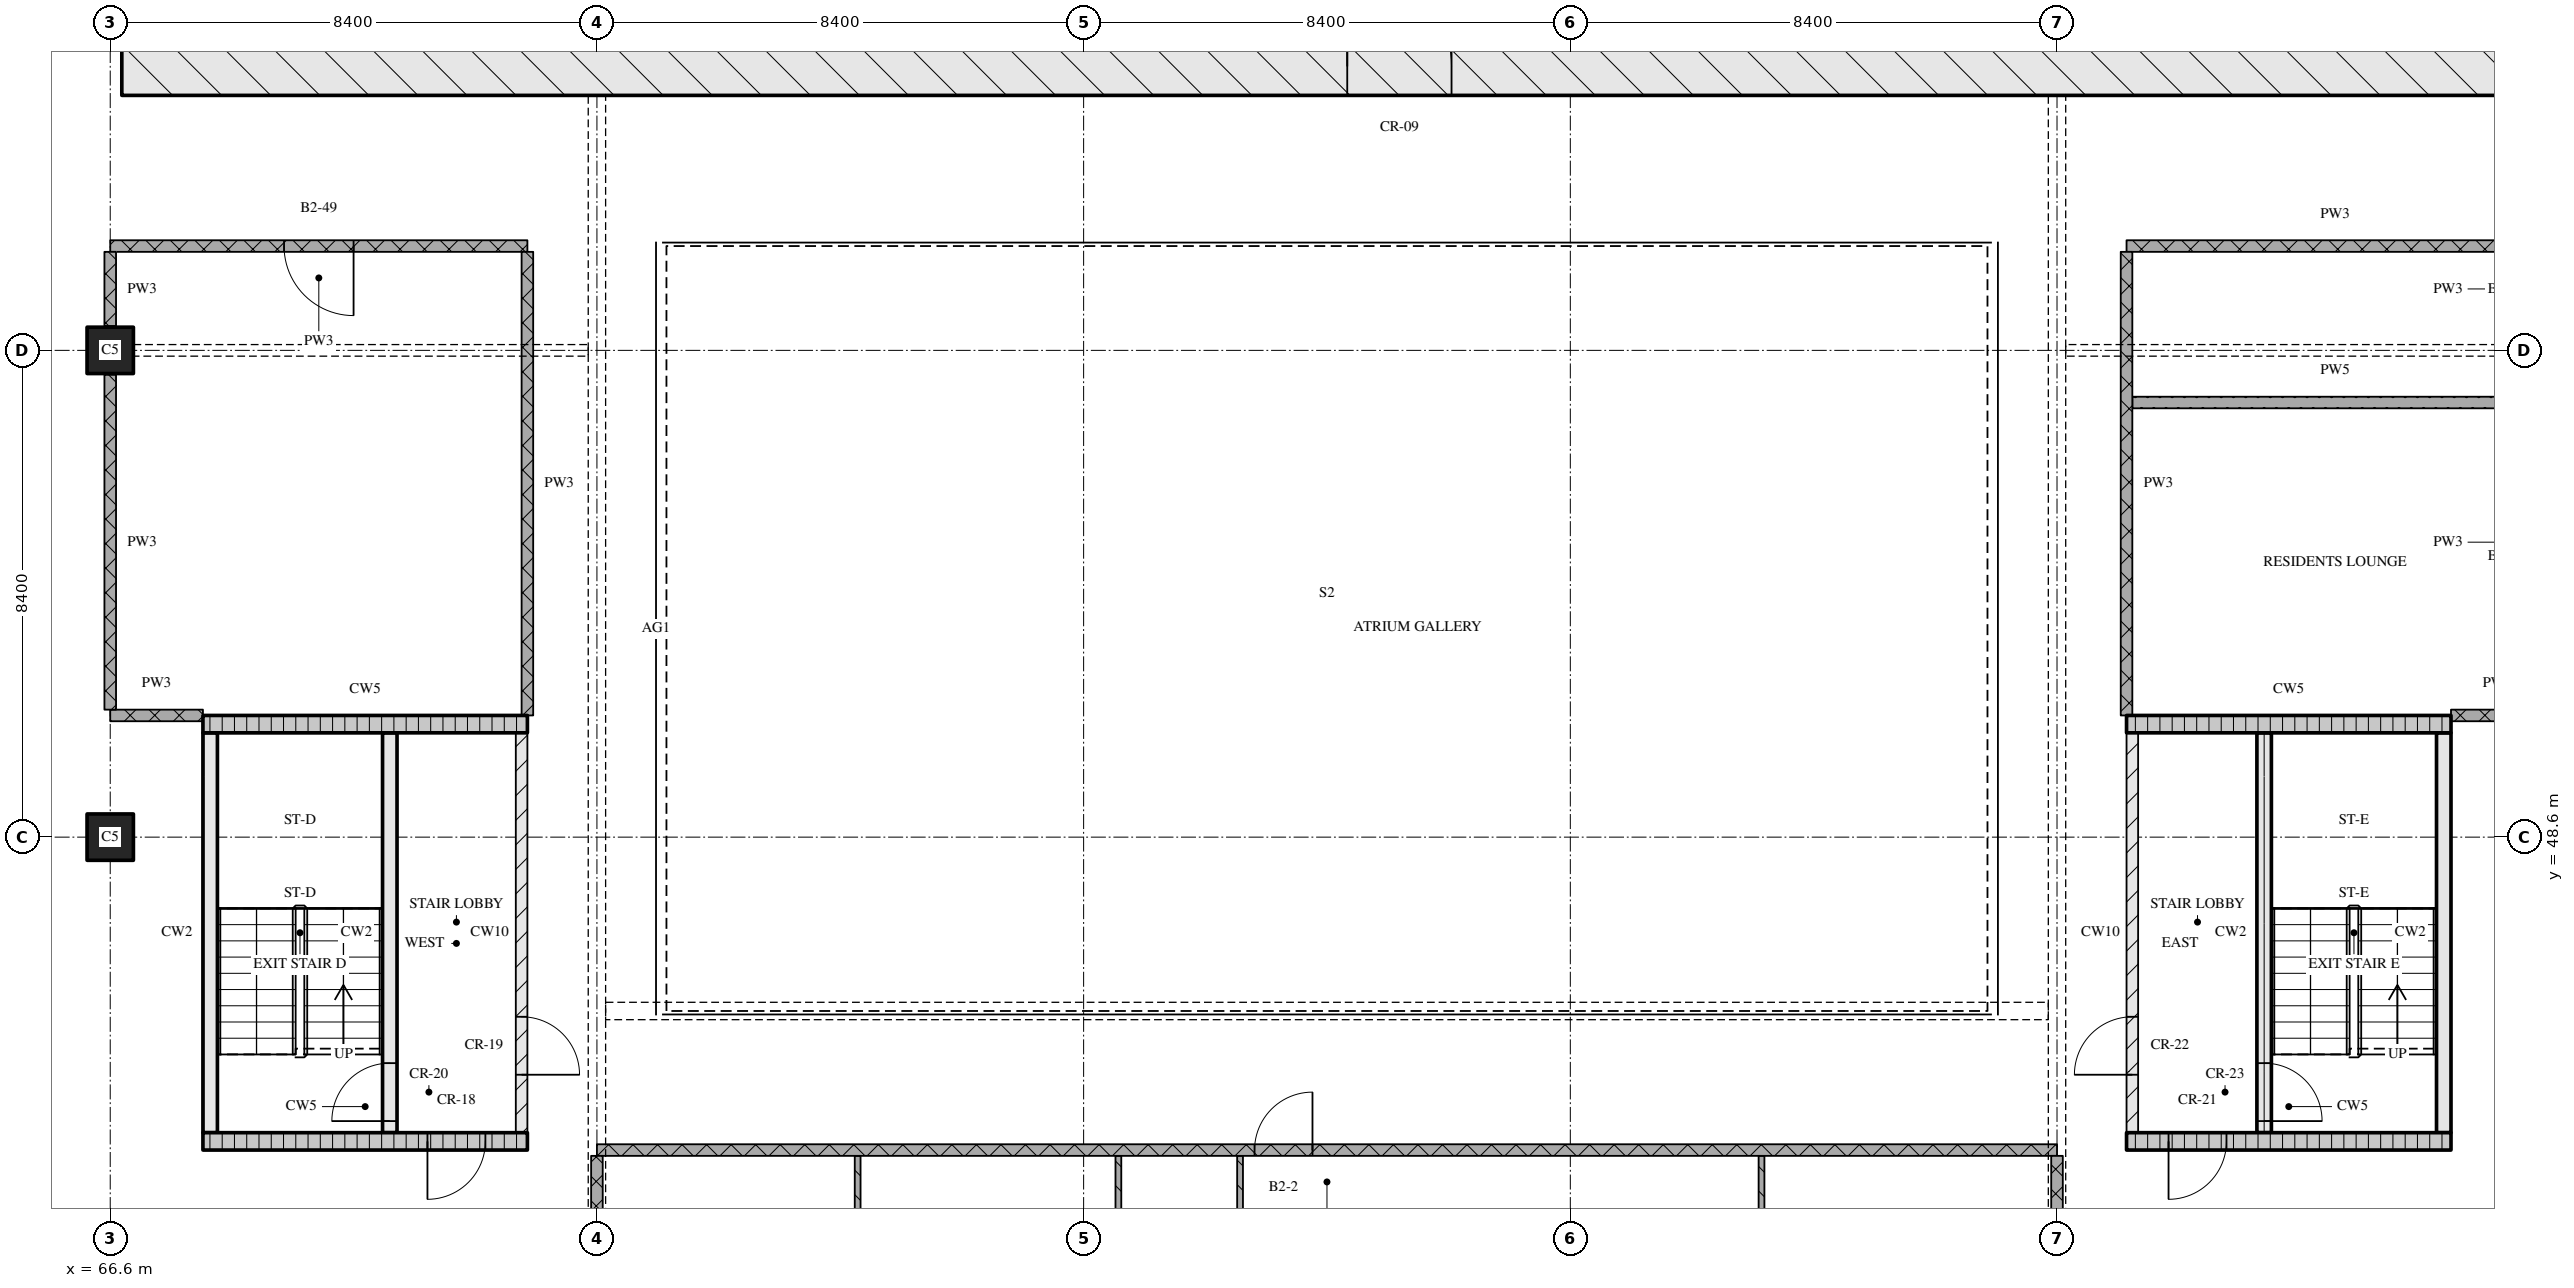
"""IFC4 building model, lengths in metres.
Left out: names, types, materials, properties, quantities, classifications, styles, units other than length and angle.
Written with IfcOpenShell. Run it as: python <this file> out.ifc"""

import sys

from ifc_helpers import new_model, si_unit, direction, frame, frame_2d, origin, origin_2d, place, context, subcontext, project, spatial, rectangle, extrude, element, fill, save


model = new_model("IFC4")
c1 = context("Model", 3, precision=1e-05, world=origin(), true_north=direction((0.0, 1.0)))
c2 = subcontext(c1, "Body", "Model", "MODEL_VIEW")
j1 = project(units=[si_unit("LENGTHUNIT", "METRE"), si_unit("PLANEANGLEUNIT", "RADIAN")], contexts=[c1])
p1 = place(None, origin())
s1 = spatial("IfcSite", under=j1, at=p1, CompositionType="ELEMENT")
p2 = place(p1, origin())
s2 = spatial("IfcBuilding", under=s1, at=p2, CompositionType="ELEMENT")
p3 = place(p2, frame((0.0, 0.0, 113.25)))
s3 = spatial("IfcBuildingStorey", under=s2, at=p3, CompositionType="ELEMENT", Elevation=113.25)
for number, where, z_axis, x_axis in (
    (1, (66.6, 48.6, 0.0), (0.0, 0.0, 1.0), (1.0, 0.0, 0.0)),
    (2, (66.6, 57.0, 0.0), (0.0, 0.0, 1.0), (1.0, 0.0, 0.0)),
):
    element("IfcColumn", number, at=place(p3, frame(where, z_axis=z_axis, x_axis=x_axis)), inside=s3, PredefinedType="COLUMN", context=c2, shape_type="SweptSolid", body=[
        extrude(rectangle(XDim=0.8, YDim=0.8, at=origin_2d()), origin(), (0.0, 0.0, 1.0), 3.6),
    ])
p4 = place(p3, frame((66.8, 61.9, 0.0), z_axis=(0.0, 0.0, 1.0), x_axis=(1.0, 0.0, 0.0)))
e3 = element("IfcWall", 3, at=p4, inside=s3, PredefinedType="SOLIDWALL", context=c2, shape_type="SweptSolid", body=[
    extrude(rectangle(XDim=41.6, YDim=1.0, at=frame_2d((20.8, 0.0))), origin(), (0.0, 0.0, 1.0), 3.32),
])
p5 = place(p4, frame((21.15, 0.0, 0.0)))
e4 = element("IfcOpeningElement", 4, at=p5, cuts=e3, PredefinedType="OPENING", context=c2, shape_type="SweptSolid", body=[
    extrude(rectangle(XDim=1.8, YDim=2.1, at=frame_2d((0.9, 1.05))), frame((0.0, 0.51, 0.0), z_axis=(0.0, -1.0, 0.0), x_axis=(1.0, 0.0, 0.0)), (0.0, 0.0, 1.0), 1.02),
])
p6 = place(p3, frame((68.2, 43.35, 0.0), z_axis=(0.0, 0.0, 1.0), x_axis=(1.0, 0.0, 0.0)))
e5 = element("IfcWall", 5, at=p6, inside=s3, PredefinedType="SOLIDWALL", context=c2, shape_type="SweptSolid", body=[
    extrude(rectangle(XDim=5.6, YDim=0.3, at=frame_2d((2.8, 0.0))), origin(), (0.0, 0.0, 1.0), 3.32),
])
p7 = place(p6, frame((3.875, 0.0, 0.0)))
e6 = element("IfcOpeningElement", 6, at=p7, cuts=e5, PredefinedType="OPENING", context=c2, shape_type="SweptSolid", body=[
    extrude(rectangle(XDim=1.0, YDim=2.1, at=frame_2d((0.5, 1.05))), frame((0.0, 0.16, 0.0), z_axis=(0.0, -1.0, 0.0), x_axis=(1.0, 0.0, 0.0)), (0.0, 0.0, 1.0), 0.32),
])
p8 = place(p3, frame((68.325, 43.5, 0.0), z_axis=(0.0, 0.0, 1.0), x_axis=(0.0, 1.0, 0.0)))
e7 = element("IfcWall", 7, at=p8, inside=s3, PredefinedType="SOLIDWALL", context=c2, shape_type="SweptSolid", body=[
    extrude(rectangle(XDim=6.9, YDim=0.25, at=frame_2d((3.45, 0.0))), origin(), (0.0, 0.0, 1.0), 3.32),
])
p9 = place(p3, frame((71.425, 43.5, 0.0), z_axis=(0.0, 0.0, 1.0), x_axis=(0.0, 1.0, 0.0)))
e8 = element("IfcWall", 8, at=p9, inside=s3, PredefinedType="SOLIDWALL", context=c2, shape_type="SweptSolid", body=[
    extrude(rectangle(XDim=6.9, YDim=0.25, at=frame_2d((3.45, 0.0))), origin(), (0.0, 0.0, 1.0), 3.32),
])
p10 = place(p9, frame((0.2, 0.0, 0.0)))
e9 = element("IfcOpeningElement", 9, at=p10, cuts=e8, PredefinedType="OPENING", context=c2, shape_type="SweptSolid", body=[
    extrude(rectangle(XDim=1.0, YDim=2.1, at=frame_2d((0.5, 1.05))), frame((0.0, 0.135, 0.0), z_axis=(0.0, -1.0, 0.0), x_axis=(1.0, 0.0, 0.0)), (0.0, 0.0, 1.0), 0.27),
])
p11 = place(p3, frame((73.7, 43.5, 0.0), z_axis=(0.0, 0.0, 1.0), x_axis=(0.0, 1.0, 0.0)))
e10 = element("IfcWall", 10, at=p11, inside=s3, PredefinedType="PARTITIONING", context=c2, shape_type="SweptSolid", body=[
    extrude(rectangle(XDim=6.9, YDim=0.2, at=frame_2d((3.45, 0.0))), origin(), (0.0, 0.0, 1.0), 3.32),
])
p12 = place(p11, frame((1.0, 0.0, 0.0)))
e11 = element("IfcOpeningElement", 11, at=p12, cuts=e10, PredefinedType="OPENING", context=c2, shape_type="SweptSolid", body=[
    extrude(rectangle(XDim=1.0, YDim=2.1, at=frame_2d((0.5, 1.05))), frame((0.0, 0.11, 0.0), z_axis=(0.0, -1.0, 0.0), x_axis=(1.0, 0.0, 0.0)), (0.0, 0.0, 1.0), 0.22),
])
p13 = place(p3, frame((68.2, 50.55, 0.0), z_axis=(0.0, 0.0, 1.0), x_axis=(1.0, 0.0, 0.0)))
e12 = element("IfcWall", 12, at=p13, inside=s3, PredefinedType="SOLIDWALL", context=c2, shape_type="SweptSolid", body=[
    extrude(rectangle(XDim=5.6, YDim=0.3, at=frame_2d((2.8, 0.0))), origin(), (0.0, 0.0, 1.0), 3.32),
])
p14 = place(p3, frame((101.4, 43.35, 0.0), z_axis=(0.0, 0.0, 1.0), x_axis=(1.0, 0.0, 0.0)))
e13 = element("IfcWall", 13, at=p14, inside=s3, PredefinedType="SOLIDWALL", context=c2, shape_type="SweptSolid", body=[
    extrude(rectangle(XDim=5.6, YDim=0.3, at=frame_2d((2.8, 0.0))), origin(), (0.0, 0.0, 1.0), 3.32),
])
p15 = place(p14, frame((0.725, 0.0, 0.0)))
e14 = element("IfcOpeningElement", 14, at=p15, cuts=e13, PredefinedType="OPENING", context=c2, shape_type="SweptSolid", body=[
    extrude(rectangle(XDim=1.0, YDim=2.1, at=frame_2d((0.5, 1.05))), frame((0.0, 0.16, 0.0), z_axis=(0.0, -1.0, 0.0), x_axis=(1.0, 0.0, 0.0)), (0.0, 0.0, 1.0), 0.32),
])
p16 = place(p3, frame((101.5, 43.5, 0.0), z_axis=(0.0, 0.0, 1.0), x_axis=(0.0, 1.0, 0.0)))
e15 = element("IfcWall", 15, at=p16, inside=s3, PredefinedType="PARTITIONING", context=c2, shape_type="SweptSolid", body=[
    extrude(rectangle(XDim=6.9, YDim=0.2, at=frame_2d((3.45, 0.0))), origin(), (0.0, 0.0, 1.0), 3.32),
])
p17 = place(p16, frame((1.0, 0.0, 0.0)))
e16 = element("IfcOpeningElement", 16, at=p17, cuts=e15, PredefinedType="OPENING", context=c2, shape_type="SweptSolid", body=[
    extrude(rectangle(XDim=1.0, YDim=2.1, at=frame_2d((0.5, 1.05))), frame((0.0, 0.11, 0.0), z_axis=(0.0, -1.0, 0.0), x_axis=(1.0, 0.0, 0.0)), (0.0, 0.0, 1.0), 0.22),
])
p18 = place(p3, frame((103.775, 43.5, 0.0), z_axis=(0.0, 0.0, 1.0), x_axis=(0.0, 1.0, 0.0)))
e17 = element("IfcWall", 17, at=p18, inside=s3, PredefinedType="SOLIDWALL", context=c2, shape_type="SweptSolid", body=[
    extrude(rectangle(XDim=6.9, YDim=0.25, at=frame_2d((3.45, 0.0))), origin(), (0.0, 0.0, 1.0), 3.32),
])
p19 = place(p18, frame((0.2, 0.0, 0.0)))
e18 = element("IfcOpeningElement", 18, at=p19, cuts=e17, PredefinedType="OPENING", context=c2, shape_type="SweptSolid", body=[
    extrude(rectangle(XDim=1.0, YDim=2.1, at=frame_2d((0.5, 1.05))), frame((0.0, 0.135, 0.0), z_axis=(0.0, -1.0, 0.0), x_axis=(1.0, 0.0, 0.0)), (0.0, 0.0, 1.0), 0.27),
])
p20 = place(p3, frame((106.875, 43.5, 0.0), z_axis=(0.0, 0.0, 1.0), x_axis=(0.0, 1.0, 0.0)))
e19 = element("IfcWall", 19, at=p20, inside=s3, PredefinedType="SOLIDWALL", context=c2, shape_type="SweptSolid", body=[
    extrude(rectangle(XDim=6.9, YDim=0.25, at=frame_2d((3.45, 0.0))), origin(), (0.0, 0.0, 1.0), 3.32),
])
p21 = place(p3, frame((101.4, 50.55, 0.0), z_axis=(0.0, 0.0, 1.0), x_axis=(1.0, 0.0, 0.0)))
e20 = element("IfcWall", 20, at=p21, inside=s3, PredefinedType="SOLIDWALL", context=c2, shape_type="SweptSolid", body=[
    extrude(rectangle(XDim=5.6, YDim=0.3, at=frame_2d((2.8, 0.0))), origin(), (0.0, 0.0, 1.0), 3.32),
])
p22 = place(p3, frame((100.2, 43.2, 0.0), z_axis=(0.0, 0.0, 1.0), x_axis=(-1.0, 0.0, 0.0)))
e21 = element("IfcWall", 21, at=p22, inside=s3, PredefinedType="PARTITIONING", context=c2, shape_type="SweptSolid", body=[
    extrude(rectangle(XDim=25.2, YDim=0.2, at=frame_2d((12.6, 0.0))), origin(), (0.0, 0.0, 1.0), 3.32),
])
p23 = place(p22, frame((12.85, 0.0, 0.0)))
e22 = element("IfcOpeningElement", 22, at=p23, cuts=e21, PredefinedType="OPENING", context=c2, shape_type="SweptSolid", body=[
    extrude(rectangle(XDim=1.0, YDim=2.1, at=frame_2d((0.5, 1.05))), frame((0.0, 0.11, 0.0), z_axis=(0.0, -1.0, 0.0), x_axis=(1.0, 0.0, 0.0)), (0.0, 0.0, 1.0), 0.22),
])
p24 = place(p3, frame((66.6, 50.7, 0.0), z_axis=(0.0, 0.0, 1.0), x_axis=(1.0, 0.0, 0.0)))
e23 = element("IfcWall", 23, at=p24, inside=s3, PredefinedType="PARTITIONING", context=c2, shape_type="SweptSolid", body=[
    extrude(rectangle(XDim=1.6, YDim=0.2, at=frame_2d((0.8, 0.0))), origin(), (0.0, 0.0, 1.0), 3.32),
])
p25 = place(p3, frame((107.0, 50.7, 0.0), z_axis=(0.0, 0.0, 1.0), x_axis=(1.0, 0.0, 0.0)))
e24 = element("IfcWall", 24, at=p25, inside=s3, PredefinedType="PARTITIONING", context=c2, shape_type="SweptSolid", body=[
    extrude(rectangle(XDim=1.6, YDim=0.2, at=frame_2d((0.8, 0.0))), origin(), (0.0, 0.0, 1.0), 3.32),
])
p26 = place(p3, frame((101.5, 56.1, 0.0), z_axis=(0.0, 0.0, 1.0), x_axis=(1.0, 0.0, 0.0)))
e25 = element("IfcWall", 25, at=p26, inside=s3, PredefinedType="PARTITIONING", context=c2, shape_type="SweptSolid", body=[
    extrude(rectangle(XDim=7.0, YDim=0.2, at=frame_2d((3.5, 0.0))), origin(), (0.0, 0.0, 1.0), 3.32),
])
p27 = place(p3, frame((73.8, 58.8, 0.0), z_axis=(0.0, 0.0, 1.0), x_axis=(-1.0, 0.0, 0.0)))
e26 = element("IfcWall", 26, at=p27, inside=s3, PredefinedType="PARTITIONING", context=c2, shape_type="SweptSolid", body=[
    extrude(rectangle(XDim=7.2, YDim=0.2, at=frame_2d((3.6, 0.0))), origin(), (0.0, 0.0, 1.0), 3.32),
])
p28 = place(p27, frame((3.0, 0.0, 0.0)))
e27 = element("IfcOpeningElement", 27, at=p28, cuts=e26, PredefinedType="OPENING", context=c2, shape_type="SweptSolid", body=[
    extrude(rectangle(XDim=1.2, YDim=2.1, at=frame_2d((0.6, 1.05))), frame((0.0, 0.11, 0.0), z_axis=(0.0, -1.0, 0.0), x_axis=(1.0, 0.0, 0.0)), (0.0, 0.0, 1.0), 0.22),
])
p29 = place(p3, frame((101.4, 58.8, 0.0), z_axis=(0.0, 0.0, 1.0), x_axis=(1.0, 0.0, 0.0)))
e28 = element("IfcWall", 28, at=p29, inside=s3, PredefinedType="PARTITIONING", context=c2, shape_type="SweptSolid", body=[
    extrude(rectangle(XDim=7.2, YDim=0.2, at=frame_2d((3.6, 0.0))), origin(), (0.0, 0.0, 1.0), 3.32),
])
p30 = place(p3, frame((66.6, 56.58, 0.0), z_axis=(0.0, 0.0, 1.0), x_axis=(0.0, -1.0, 0.0)))
e29 = element("IfcWall", 29, at=p30, inside=s3, PredefinedType="PARTITIONING", context=c2, shape_type="SweptSolid", body=[
    extrude(rectangle(XDim=5.78, YDim=0.2, at=frame_2d((2.89, 0.0))), origin(), (0.0, 0.0, 1.0), 3.32),
])
p31 = place(p3, frame((66.6, 58.7, 0.0), z_axis=(0.0, 0.0, 1.0), x_axis=(0.0, -1.0, 0.0)))
e30 = element("IfcWall", 30, at=p31, inside=s3, PredefinedType="PARTITIONING", context=c2, shape_type="SweptSolid", body=[
    extrude(rectangle(XDim=1.28, YDim=0.2, at=frame_2d((0.64, 0.0))), origin(), (0.0, 0.0, 1.0), 3.32),
])
p32 = place(p3, frame((73.8, 58.7, 0.0), z_axis=(0.0, 0.0, 1.0), x_axis=(0.0, -1.0, 0.0)))
e31 = element("IfcWall", 31, at=p32, inside=s3, PredefinedType="PARTITIONING", context=c2, shape_type="SweptSolid", body=[
    extrude(rectangle(XDim=8.0, YDim=0.2, at=frame_2d((4.0, 0.0))), origin(), (0.0, 0.0, 1.0), 3.32),
])
p33 = place(p3, frame((75.0, 43.1, 0.0), z_axis=(0.0, 0.0, 1.0), x_axis=(0.0, -1.0, 0.0)))
e32 = element("IfcWall", 32, at=p33, inside=s3, PredefinedType="PARTITIONING", context=c2, shape_type="SweptSolid", body=[
    extrude(rectangle(XDim=2.2, YDim=0.2, at=frame_2d((1.1, 0.0))), origin(), (0.0, 0.0, 1.0), 2.43),
])
for number, where, z_axis, x_axis in (
    (33, (79.5, 43.1, 0.0), (0.0, 0.0, 1.0), (0.0, -1.0, 0.0)),
    (34, (84.0, 43.1, 0.0), (0.0, 0.0, 1.0), (0.0, -1.0, 0.0)),
):
    element("IfcWall", number, at=place(p3, frame(where, z_axis=z_axis, x_axis=x_axis)), inside=s3, PredefinedType="PARTITIONING", context=c2, shape_type="SweptSolid", body=[
        extrude(rectangle(XDim=4.35, YDim=0.1, at=frame_2d((2.175, 0.0))), origin(), (0.0, 0.0, 1.0), 3.32),
    ])
p34 = place(p3, frame((86.1, 38.75, 0.0), z_axis=(0.0, 0.0, 1.0), x_axis=(0.0, 1.0, 0.0)))
e35 = element("IfcWall", 35, at=p34, inside=s3, PredefinedType="PARTITIONING", context=c2, shape_type="SweptSolid", body=[
    extrude(rectangle(XDim=4.35, YDim=0.1, at=frame_2d((2.175, 0.0))), origin(), (0.0, 0.0, 1.0), 3.32),
])
p35 = place(p34, frame((1.75, 0.0, 0.0)))
e36 = element("IfcOpeningElement", 36, at=p35, cuts=e35, PredefinedType="OPENING", context=c2, shape_type="SweptSolid", body=[
    extrude(rectangle(XDim=0.9, YDim=2.1, at=frame_2d((0.45, 1.05))), frame((0.0, 0.06, 0.0), z_axis=(0.0, -1.0, 0.0), x_axis=(1.0, 0.0, 0.0)), (0.0, 0.0, 1.0), 0.12),
])
p36 = place(p3, frame((95.1, 43.1, 0.0), z_axis=(0.0, 0.0, 1.0), x_axis=(0.0, -1.0, 0.0)))
e37 = element("IfcWall", 37, at=p36, inside=s3, PredefinedType="PARTITIONING", context=c2, shape_type="SweptSolid", body=[
    extrude(rectangle(XDim=4.35, YDim=0.1, at=frame_2d((2.175, 0.0))), origin(), (0.0, 0.0, 1.0), 3.32),
])
p37 = place(p3, frame((100.2, 43.1, 0.0), z_axis=(0.0, 0.0, 1.0), x_axis=(0.0, -1.0, 0.0)))
e38 = element("IfcWall", 38, at=p37, inside=s3, PredefinedType="PARTITIONING", context=c2, shape_type="SweptSolid", body=[
    extrude(rectangle(XDim=2.2, YDim=0.2, at=frame_2d((1.1, 0.0))), origin(), (0.0, 0.0, 1.0), 2.43),
])
p38 = place(p3, frame((101.4, 58.7, 0.0), z_axis=(0.0, 0.0, 1.0), x_axis=(0.0, -1.0, 0.0)))
e39 = element("IfcWall", 39, at=p38, inside=s3, PredefinedType="PARTITIONING", context=c2, shape_type="SweptSolid", body=[
    extrude(rectangle(XDim=8.0, YDim=0.2, at=frame_2d((4.0, 0.0))), origin(), (0.0, 0.0, 1.0), 3.32),
])
p39 = place(p5, origin())
e40 = element("IfcDoor", 40, at=p39, inside=s3, OperationType="DOUBLE_DOOR_SINGLE_SWING", PredefinedType="DOOR", context=c2, shape_type="SweptSolid", body=[
    extrude(rectangle(XDim=1.8, YDim=2.1, at=frame_2d((0.9, 1.05))), frame((0.0, 0.025, 0.0), z_axis=(0.0, -1.0, 0.0), x_axis=(1.0, 0.0, 0.0)), (0.0, 0.0, 1.0), 0.05),
])
fill(e4, e40)
p40 = place(p7, origin())
e41 = element("IfcDoor", 41, at=p40, inside=s3, OperationType="SINGLE_SWING_RIGHT", PredefinedType="DOOR", context=c2, shape_type="SweptSolid", body=[
    extrude(rectangle(XDim=1.0, YDim=2.1, at=frame_2d((0.5, 1.05))), frame((0.0, 0.025, 0.0), z_axis=(0.0, -1.0, 0.0), x_axis=(1.0, 0.0, 0.0)), (0.0, 0.0, 1.0), 0.05),
])
fill(e6, e41)
p41 = place(p10, origin())
e42 = element("IfcDoor", 42, at=p41, inside=s3, OperationType="SINGLE_SWING_LEFT", PredefinedType="DOOR", context=c2, shape_type="SweptSolid", body=[
    extrude(rectangle(XDim=1.0, YDim=2.1, at=frame_2d((0.5, 1.05))), frame((0.0, 0.025, 0.0), z_axis=(0.0, -1.0, 0.0), x_axis=(1.0, 0.0, 0.0)), (0.0, 0.0, 1.0), 0.05),
])
fill(e9, e42)
p42 = place(p12, origin())
e43 = element("IfcDoor", 43, at=p42, inside=s3, OperationType="SINGLE_SWING_RIGHT", PredefinedType="DOOR", context=c2, shape_type="SweptSolid", body=[
    extrude(rectangle(XDim=1.0, YDim=2.1, at=frame_2d((0.5, 1.05))), frame((0.0, 0.025, 0.0), z_axis=(0.0, -1.0, 0.0), x_axis=(1.0, 0.0, 0.0)), (0.0, 0.0, 1.0), 0.05),
])
fill(e11, e43)
p43 = place(p15, origin())
e44 = element("IfcDoor", 44, at=p43, inside=s3, OperationType="SINGLE_SWING_RIGHT", PredefinedType="DOOR", context=c2, shape_type="SweptSolid", body=[
    extrude(rectangle(XDim=1.0, YDim=2.1, at=frame_2d((0.5, 1.05))), frame((0.0, 0.025, 0.0), z_axis=(0.0, -1.0, 0.0), x_axis=(1.0, 0.0, 0.0)), (0.0, 0.0, 1.0), 0.05),
])
fill(e14, e44)
p44 = place(p19, origin())
e45 = element("IfcDoor", 45, at=p44, inside=s3, OperationType="SINGLE_SWING_RIGHT", PredefinedType="DOOR", context=c2, shape_type="SweptSolid", body=[
    extrude(rectangle(XDim=1.0, YDim=2.1, at=frame_2d((0.5, 1.05))), frame((0.0, 0.025, 0.0), z_axis=(0.0, -1.0, 0.0), x_axis=(1.0, 0.0, 0.0)), (0.0, 0.0, 1.0), 0.05),
])
fill(e18, e45)
p45 = place(p17, origin())
e46 = element("IfcDoor", 46, at=p45, inside=s3, OperationType="SINGLE_SWING_LEFT", PredefinedType="DOOR", context=c2, shape_type="SweptSolid", body=[
    extrude(rectangle(XDim=1.0, YDim=2.1, at=frame_2d((0.5, 1.05))), frame((0.0, 0.025, 0.0), z_axis=(0.0, -1.0, 0.0), x_axis=(1.0, 0.0, 0.0)), (0.0, 0.0, 1.0), 0.05),
])
fill(e16, e46)
p46 = place(p23, origin())
e47 = element("IfcDoor", 47, at=p46, inside=s3, OperationType="SINGLE_SWING_RIGHT", PredefinedType="DOOR", context=c2, shape_type="SweptSolid", body=[
    extrude(rectangle(XDim=1.0, YDim=2.1, at=frame_2d((0.5, 1.05))), frame((0.0, 0.025, 0.0), z_axis=(0.0, -1.0, 0.0), x_axis=(1.0, 0.0, 0.0)), (0.0, 0.0, 1.0), 0.05),
])
fill(e22, e47)
p47 = place(p28, origin())
e48 = element("IfcDoor", 48, at=p47, inside=s3, OperationType="SINGLE_SWING_LEFT", PredefinedType="DOOR", context=c2, shape_type="SweptSolid", body=[
    extrude(rectangle(XDim=1.2, YDim=2.1, at=frame_2d((0.6, 1.05))), frame((0.0, 0.025, 0.0), z_axis=(0.0, -1.0, 0.0), x_axis=(1.0, 0.0, 0.0)), (0.0, 0.0, 1.0), 0.05),
])
fill(e27, e48)
save(model, sys.argv[1])
